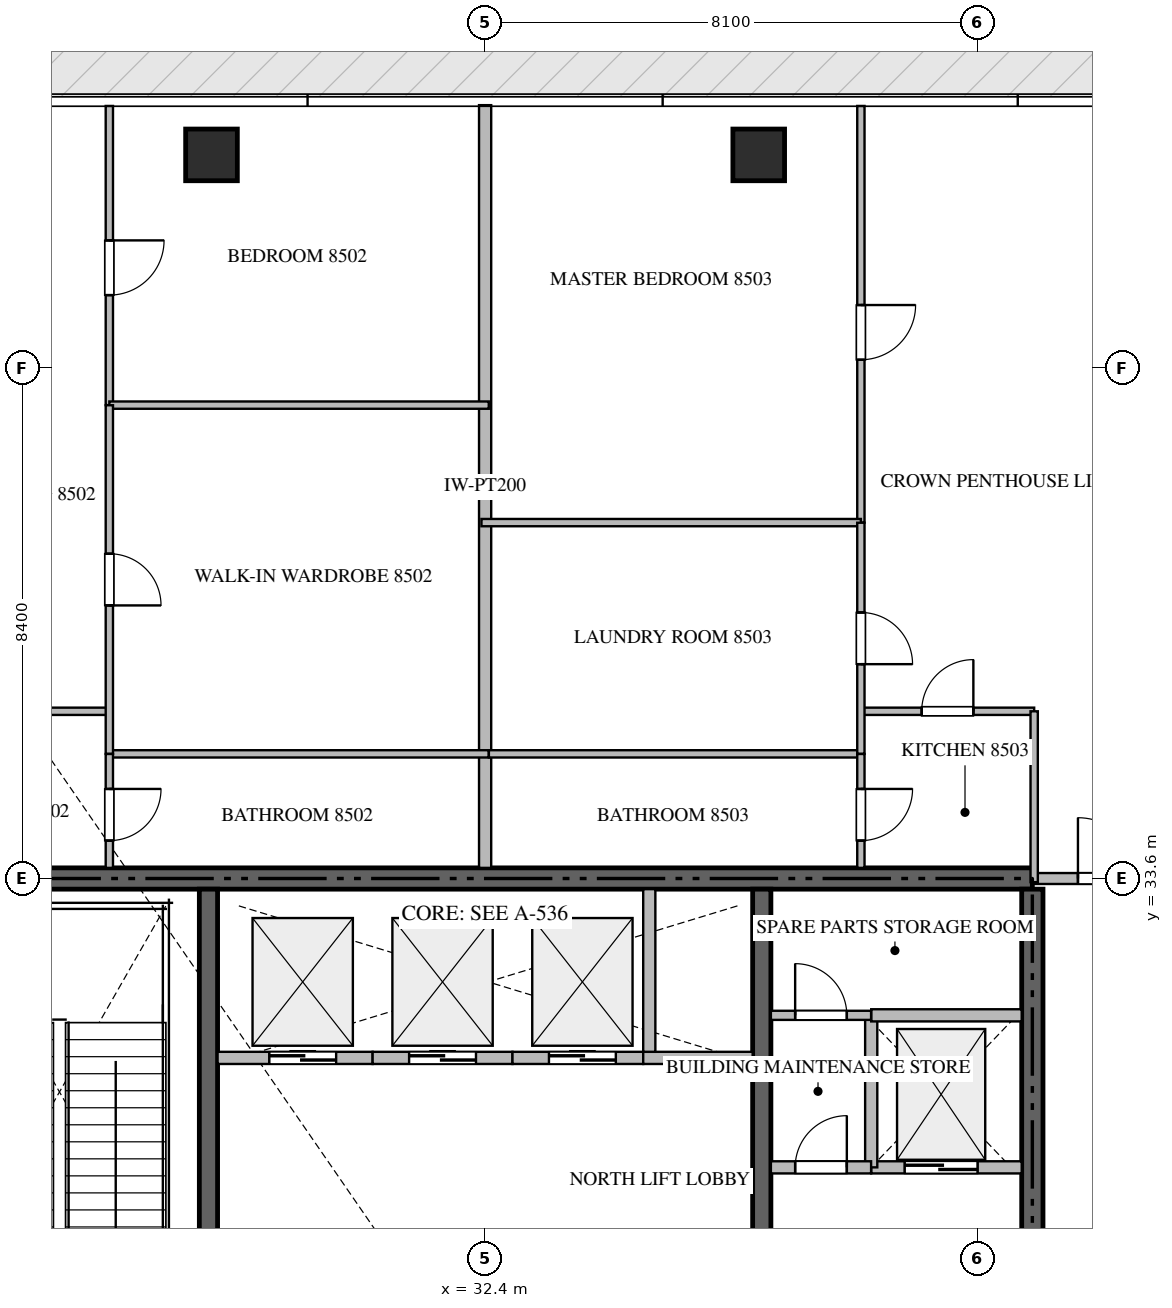
"""IFC4 building model, lengths in metres.
Left out: names, types, materials, properties, quantities, classifications, styles, units other than length and angle.
Written with IfcOpenShell. Run it as: python <this file> out.ifc"""

import sys

from ifc_helpers import new_model, si_unit, direction, frame, frame_2d, origin, origin_2d, place, context, subcontext, project, spatial, rectangle, extrude, source, transform, mapped, element, fill, save


model = new_model("IFC4")
c1 = context("Model", 3, precision=1e-05, world=origin(), true_north=direction((0.0, 1.0)))
c2 = subcontext(c1, "Body", "Model", "MODEL_VIEW")
j1 = project(units=[si_unit("LENGTHUNIT", "METRE"), si_unit("PLANEANGLEUNIT", "RADIAN")], contexts=[c1])
p1 = place(None, origin())
s1 = spatial("IfcSite", under=j1, at=p1, CompositionType="ELEMENT")
p2 = place(p1, origin())
s2 = spatial("IfcBuilding", under=s1, at=p2, CompositionType="ELEMENT")
p3 = place(p2, frame((0.0, 0.0, 342.05)))
s3 = spatial("IfcBuildingStorey", under=s2, at=p3, CompositionType="ELEMENT", Elevation=342.05)
p4 = place(p3, frame((41.4, 33.6, -0.26), z_axis=(0.0, 0.0, 1.0), x_axis=(-1.0, 0.0, 0.0)))
e1 = element("IfcWall", 1, at=p4, inside=s3, PredefinedType="SHEAR", context=c2, shape_type="SweptSolid", body=[
    extrude(rectangle(XDim=18.0, YDim=0.35, at=frame_2d((9.0, 0.0))), origin(), (0.0, 0.0, 1.0), 5.898),
])
p5 = place(p3, frame((41.4, 27.75, -0.26), z_axis=(0.0, 0.0, 1.0), x_axis=(0.0, 1.0, 0.0)))
e2 = element("IfcWall", 2, at=p5, inside=s3, PredefinedType="SHEAR", context=c2, shape_type="SweptSolid", body=[
    extrude(rectangle(XDim=5.675, YDim=0.35, at=frame_2d((2.837, 0.0))), origin(), (0.0, 0.0, 1.0), 5.898),
])
p6 = place(p3, frame((27.85, 23.55, -0.26), z_axis=(0.0, 0.0, 1.0), x_axis=(0.0, 1.0, 0.0)))
e3 = element("IfcWall", 3, at=p6, inside=s3, PredefinedType="SHEAR", context=c2, shape_type="SweptSolid", body=[
    extrude(rectangle(XDim=9.875, YDim=0.3, at=frame_2d((4.938, 0.0))), origin(), (0.0, 0.0, 1.0), 5.898),
])
p7 = place(p3, frame((36.95, 27.05, -0.26), z_axis=(0.0, 0.0, 1.0), x_axis=(0.0, 1.0, 0.0)))
e4 = element("IfcWall", 4, at=p7, inside=s3, PredefinedType="SHEAR", context=c2, shape_type="SweptSolid", body=[
    extrude(rectangle(XDim=6.375, YDim=0.3, at=frame_2d((3.188, 0.0))), origin(), (0.0, 0.0, 1.0), 5.898),
])
m1 = source(origin(), c2, "Body", "SweptSolid", [
    extrude(rectangle(XDim=0.85, YDim=0.85, at=origin_2d()), origin(), (0.0, 0.0, 1.0), 5.9),
])
for number, where, z_axis, x_axis in (
    (5, (27.9, 45.5, -0.26), (0.0, 0.0, 1.0), (1.0, 0.0, 0.0)),
    (6, (36.9, 45.5, -0.26), (0.0, 0.0, 1.0), (1.0, 0.0, 0.0)),
):
    element("IfcColumn", number, at=place(p3, frame(where, z_axis=z_axis, x_axis=x_axis)), inside=s3, PredefinedType="COLUMN", context=c2, shape_type="MappedRepresentation", body=[
        mapped(m1, transform((0.0, 0.0, 0.0), scale=1.0)),
    ])
p8 = place(p3, frame((38.75, 28.85, 0.0), z_axis=(0.0, 0.0, 1.0), x_axis=(1.0, 0.0, 0.0)))
e7 = element("IfcWall", 7, at=p8, inside=s3, PredefinedType="STANDARD", context=c2, shape_type="SweptSolid", body=[
    extrude(rectangle(XDim=2.475, YDim=0.2, at=frame_2d((1.238, 0.0))), origin(), (0.0, 0.0, 1.0), 5.64),
])
p9 = place(p8, frame((0.55, 0.0, 0.0)))
e8 = element("IfcOpeningElement", 8, at=p9, cuts=e7, PredefinedType="OPENING", context=c2, shape_type="SweptSolid", body=[
    extrude(rectangle(XDim=1.2, YDim=2.2, at=frame_2d((0.6, 1.1))), frame((0.0, 0.11, 0.0), z_axis=(0.0, -1.0, 0.0), x_axis=(1.0, 0.0, 0.0)), (0.0, 0.0, 1.0), 0.22),
])
p10 = place(p3, frame((28.0, 30.65, 0.0), z_axis=(0.0, 0.0, 1.0), x_axis=(1.0, 0.0, 0.0)))
e9 = element("IfcWall", 9, at=p10, inside=s3, PredefinedType="STANDARD", context=c2, shape_type="SweptSolid", body=[
    extrude(rectangle(XDim=2.55, YDim=0.2, at=frame_2d((1.275, 0.0))), origin(), (0.0, 0.0, 1.0), 5.64),
])
p11 = place(p10, frame((0.85, 0.0, 0.0)))
e10 = element("IfcOpeningElement", 10, at=p11, cuts=e9, PredefinedType="OPENING", context=c2, shape_type="SweptSolid", body=[
    extrude(rectangle(XDim=1.1, YDim=2.2, at=frame_2d((0.55, 1.1))), frame((0.0, 0.11, 0.0), z_axis=(0.0, -1.0, 0.0), x_axis=(1.0, 0.0, 0.0)), (0.0, 0.0, 1.0), 0.22),
])
p12 = place(p3, frame((30.55, 30.65, 0.0), z_axis=(0.0, 0.0, 1.0), x_axis=(1.0, 0.0, 0.0)))
e11 = element("IfcWall", 11, at=p12, inside=s3, PredefinedType="STANDARD", context=c2, shape_type="SweptSolid", body=[
    extrude(rectangle(XDim=2.3, YDim=0.2, at=frame_2d((1.15, 0.0))), origin(), (0.0, 0.0, 1.0), 5.64),
])
p13 = place(p12, frame((0.6, 0.0, 0.0)))
e12 = element("IfcOpeningElement", 12, at=p13, cuts=e11, PredefinedType="OPENING", context=c2, shape_type="SweptSolid", body=[
    extrude(rectangle(XDim=1.1, YDim=2.2, at=frame_2d((0.55, 1.1))), frame((0.0, 0.11, 0.0), z_axis=(0.0, -1.0, 0.0), x_axis=(1.0, 0.0, 0.0)), (0.0, 0.0, 1.0), 0.22),
])
p14 = place(p3, frame((32.85, 30.65, 0.0), z_axis=(0.0, 0.0, 1.0), x_axis=(1.0, 0.0, 0.0)))
e13 = element("IfcWall", 13, at=p14, inside=s3, PredefinedType="STANDARD", context=c2, shape_type="SweptSolid", body=[
    extrude(rectangle(XDim=2.15, YDim=0.2, at=frame_2d((1.075, 0.0))), origin(), (0.0, 0.0, 1.0), 5.64),
])
p15 = place(p14, frame((0.6, 0.0, 0.0)))
e14 = element("IfcOpeningElement", 14, at=p15, cuts=e13, PredefinedType="OPENING", context=c2, shape_type="SweptSolid", body=[
    extrude(rectangle(XDim=1.1, YDim=2.2, at=frame_2d((0.55, 1.1))), frame((0.0, 0.11, 0.0), z_axis=(0.0, -1.0, 0.0), x_axis=(1.0, 0.0, 0.0)), (0.0, 0.0, 1.0), 0.22),
])
p16 = place(p3, frame((35.0, 30.65, 0.0), z_axis=(0.0, 0.0, 1.0), x_axis=(1.0, 0.0, 0.0)))
e15 = element("IfcWall", 15, at=p16, inside=s3, PredefinedType="STANDARD", context=c2, shape_type="SweptSolid", body=[
    extrude(rectangle(XDim=1.8, YDim=0.2, at=frame_2d((0.9, 0.0))), origin(), (0.0, 0.0, 1.0), 5.64),
])
p17 = place(p3, frame((35.1, 30.75, 0.0), z_axis=(0.0, 0.0, 1.0), x_axis=(0.0, 1.0, 0.0)))
e16 = element("IfcWall", 16, at=p17, inside=s3, PredefinedType="STANDARD", context=c2, shape_type="SweptSolid", body=[
    extrude(rectangle(XDim=2.675, YDim=0.2, at=frame_2d((1.337, 0.0))), origin(), (0.0, 0.0, 1.0), 5.64),
])
p18 = place(p3, frame((38.75, 28.85, 0.0), z_axis=(0.0, 0.0, 1.0), x_axis=(0.0, 1.0, 0.0)))
e17 = element("IfcWall", 17, at=p18, inside=s3, PredefinedType="STANDARD", context=c2, shape_type="SweptSolid", body=[
    extrude(rectangle(XDim=2.5, YDim=0.2, at=frame_2d((1.25, 0.0))), origin(), (0.0, 0.0, 1.0), 5.64),
])
p19 = place(p3, frame((38.75, 31.35, 0.0), z_axis=(0.0, 0.0, 1.0), x_axis=(1.0, 0.0, 0.0)))
e18 = element("IfcWall", 18, at=p19, inside=s3, PredefinedType="STANDARD", context=c2, shape_type="SweptSolid", body=[
    extrude(rectangle(XDim=2.475, YDim=0.2, at=frame_2d((1.238, 0.0))), origin(), (0.0, 0.0, 1.0), 5.64),
])
p20 = place(p3, frame((37.1, 28.85, 0.0), z_axis=(0.0, 0.0, 1.0), x_axis=(1.0, 0.0, 0.0)))
e19 = element("IfcWall", 19, at=p20, inside=s3, PredefinedType="STANDARD", context=c2, shape_type="SweptSolid", body=[
    extrude(rectangle(XDim=1.648, YDim=0.2, at=frame_2d((0.824, 0.0))), origin(), (0.0, 0.0, 1.0), 5.64),
])
p21 = place(p20, frame((0.399, 0.0, 0.0)))
e20 = element("IfcOpeningElement", 20, at=p21, cuts=e19, PredefinedType="OPENING", context=c2, shape_type="SweptSolid", body=[
    extrude(rectangle(XDim=0.85, YDim=2.1, at=frame_2d((0.425, 1.05))), frame((0.0, 0.11, 0.0), z_axis=(0.0, -1.0, 0.0), x_axis=(1.0, 0.0, 0.0)), (0.0, 0.0, 1.0), 0.22),
])
p22 = place(p3, frame((37.1, 31.35, 0.0), z_axis=(0.0, 0.0, 1.0), x_axis=(1.0, 0.0, 0.0)))
e21 = element("IfcWall", 21, at=p22, inside=s3, PredefinedType="PARTITIONING", context=c2, shape_type="SweptSolid", body=[
    extrude(rectangle(XDim=1.648, YDim=0.15, at=frame_2d((0.824, 0.0))), origin(), (0.0, 0.0, 1.0), 5.64),
])
p23 = place(p22, frame((0.399, 0.0, 0.0)))
e22 = element("IfcOpeningElement", 22, at=p23, cuts=e21, PredefinedType="OPENING", context=c2, shape_type="SweptSolid", body=[
    extrude(rectangle(XDim=0.85, YDim=2.1, at=frame_2d((0.425, 1.05))), frame((0.0, 0.085, 0.0), z_axis=(0.0, -1.0, 0.0), x_axis=(1.0, 0.0, 0.0)), (0.0, 0.0, 1.0), 0.17),
])
p24 = place(p3, frame((32.4, 33.775, 0.0), z_axis=(0.0, 0.0, 1.0), x_axis=(0.0, 1.0, 0.0)))
e23 = element("IfcWall", 23, at=p24, inside=s3, PredefinedType="PARTITIONING", context=c2, shape_type="SweptSolid", body=[
    extrude(rectangle(XDim=12.543, YDim=0.2, at=frame_2d((6.271, 0.0))), origin(), (0.0, 0.0, 1.0), 5.64),
])
p25 = place(p3, frame((41.402, 33.6, 0.0), z_axis=(0.0, 0.0, 1.0), x_axis=(1.0, 0.0, 0.0)))
e24 = element("IfcWall", 24, at=p25, inside=s3, PredefinedType="PARTITIONING", context=c2, shape_type="SweptSolid", body=[
    extrude(rectangle(XDim=2.496, YDim=0.18, at=frame_2d((1.248, 0.0))), origin(), (0.0, 0.0, 1.0), 5.64),
])
p26 = place(p25, frame((0.748, 0.0, 0.0)))
e25 = element("IfcOpeningElement", 25, at=p26, cuts=e24, PredefinedType="OPENING", context=c2, shape_type="SweptSolid", body=[
    extrude(rectangle(XDim=1.0, YDim=2.15, at=frame_2d((0.5, 1.075))), frame((0.0, 0.1, 0.0), z_axis=(0.0, -1.0, 0.0), x_axis=(1.0, 0.0, 0.0)), (0.0, 0.0, 1.0), 0.2),
])
p27 = place(p3, frame((23.37, 36.35, 0.0), z_axis=(0.0, 0.0, 1.0), x_axis=(1.0, 0.0, 0.0)))
e26 = element("IfcWall", 26, at=p27, inside=s3, PredefinedType="PARTITIONING", context=c2, shape_type="SweptSolid", body=[
    extrude(rectangle(XDim=2.85, YDim=0.12, at=frame_2d((1.425, 0.0))), origin(), (0.0, 0.0, 1.0), 5.64),
])
p28 = place(p27, frame((1.0, 0.0, 0.0)))
e27 = element("IfcOpeningElement", 27, at=p28, cuts=e26, PredefinedType="OPENING", context=c2, shape_type="SweptSolid", body=[
    extrude(rectangle(XDim=0.85, YDim=2.1, at=frame_2d((0.425, 1.05))), frame((0.0, 0.07, 0.0), z_axis=(0.0, -1.0, 0.0), x_axis=(1.0, 0.0, 0.0)), (0.0, 0.0, 1.0), 0.14),
])
p29 = place(p3, frame((26.22, 46.305, 0.0), z_axis=(0.0, 0.0, 1.0), x_axis=(0.0, -1.0, 0.0)))
e28 = element("IfcWall", 28, at=p29, inside=s3, PredefinedType="PARTITIONING", context=c2, shape_type="SweptSolid", body=[
    extrude(rectangle(XDim=4.92, YDim=0.12, at=frame_2d((2.46, 0.0))), origin(), (0.0, 0.0, 1.0), 5.64),
])
p30 = place(p29, frame((2.211, 0.0, 0.0)))
e29 = element("IfcOpeningElement", 29, at=p30, cuts=e28, PredefinedType="OPENING", context=c2, shape_type="SweptSolid", body=[
    extrude(rectangle(XDim=0.9, YDim=2.1, at=frame_2d((0.45, 1.05))), frame((0.0, 0.07, 0.0), z_axis=(0.0, -1.0, 0.0), x_axis=(1.0, 0.0, 0.0)), (0.0, 0.0, 1.0), 0.14),
])
for number, where, z_axis, x_axis in (
    (30, (26.22, 41.385, 0.0), (0.0, 0.0, 1.0), (1.0, 0.0, 0.0)),
    (31, (26.22, 35.65, 0.0), (0.0, 0.0, 1.0), (1.0, 0.0, 0.0)),
):
    element("IfcWall", number, at=place(p3, frame(where, z_axis=z_axis, x_axis=x_axis)), inside=s3, PredefinedType="PARTITIONING", context=c2, shape_type="SweptSolid", body=[
        extrude(rectangle(XDim=6.24, YDim=0.12, at=frame_2d((3.12, 0.0))), origin(), (0.0, 0.0, 1.0), 5.64),
    ])
p31 = place(p3, frame((26.22, 41.383, 0.0), z_axis=(0.0, 0.0, 1.0), x_axis=(0.0, -1.0, 0.0)))
e32 = element("IfcWall", 32, at=p31, inside=s3, PredefinedType="PARTITIONING", context=c2, shape_type="SweptSolid", body=[
    extrude(rectangle(XDim=5.733, YDim=0.12, at=frame_2d((2.867, 0.0))), origin(), (0.0, 0.0, 1.0), 5.64),
])
p32 = place(p31, frame((2.442, 0.0, 0.0)))
e33 = element("IfcOpeningElement", 33, at=p32, cuts=e32, PredefinedType="OPENING", context=c2, shape_type="SweptSolid", body=[
    extrude(rectangle(XDim=0.85, YDim=2.1, at=frame_2d((0.425, 1.05))), frame((0.0, 0.07, 0.0), z_axis=(0.0, -1.0, 0.0), x_axis=(1.0, 0.0, 0.0)), (0.0, 0.0, 1.0), 0.14),
])
p33 = place(p3, frame((26.22, 35.648, 0.0), z_axis=(0.0, 0.0, 1.0), x_axis=(0.0, -1.0, 0.0)))
e34 = element("IfcWall", 34, at=p33, inside=s3, PredefinedType="PARTITIONING", context=c2, shape_type="SweptSolid", body=[
    extrude(rectangle(XDim=1.873, YDim=0.12, at=frame_2d((0.937, 0.0))), origin(), (0.0, 0.0, 1.0), 5.64),
])
p34 = place(p33, frame((0.575, 0.0, 0.0)))
e35 = element("IfcOpeningElement", 35, at=p34, cuts=e34, PredefinedType="OPENING", context=c2, shape_type="SweptSolid", body=[
    extrude(rectangle(XDim=0.85, YDim=2.1, at=frame_2d((0.425, 1.05))), frame((0.0, 0.07, 0.0), z_axis=(0.0, -1.0, 0.0), x_axis=(1.0, 0.0, 0.0)), (0.0, 0.0, 1.0), 0.14),
])
p35 = place(p3, frame((38.58, 36.35, 0.0), z_axis=(0.0, 0.0, 1.0), x_axis=(1.0, 0.0, 0.0)))
e36 = element("IfcWall", 36, at=p35, inside=s3, PredefinedType="PARTITIONING", context=c2, shape_type="SweptSolid", body=[
    extrude(rectangle(XDim=2.85, YDim=0.12, at=frame_2d((1.425, 0.0))), origin(), (0.0, 0.0, 1.0), 5.64),
])
p36 = place(p35, frame((1.0, 0.0, 0.0)))
e37 = element("IfcOpeningElement", 37, at=p36, cuts=e36, PredefinedType="OPENING", context=c2, shape_type="SweptSolid", body=[
    extrude(rectangle(XDim=0.85, YDim=2.1, at=frame_2d((0.425, 1.05))), frame((0.0, 0.07, 0.0), z_axis=(0.0, -1.0, 0.0), x_axis=(1.0, 0.0, 0.0)), (0.0, 0.0, 1.0), 0.14),
])
p37 = place(p3, frame((41.43, 36.35, 0.0), z_axis=(0.0, 0.0, 1.0), x_axis=(0.0, -1.0, 0.0)))
e38 = element("IfcWall", 38, at=p37, inside=s3, PredefinedType="PARTITIONING", context=c2, shape_type="SweptSolid", body=[
    extrude(rectangle(XDim=2.81, YDim=0.12, at=frame_2d((1.405, 0.0))), origin(), (0.0, 0.0, 1.0), 5.64),
])
p38 = place(p3, frame((38.58, 46.305, 0.0), z_axis=(0.0, 0.0, 1.0), x_axis=(0.0, -1.0, 0.0)))
e39 = element("IfcWall", 39, at=p38, inside=s3, PredefinedType="PARTITIONING", context=c2, shape_type="SweptSolid", body=[
    extrude(rectangle(XDim=6.852, YDim=0.12, at=frame_2d((3.426, 0.0))), origin(), (0.0, 0.0, 1.0), 5.64),
])
p39 = place(p38, frame((3.274, 0.0, 0.0)))
e40 = element("IfcOpeningElement", 40, at=p39, cuts=e39, PredefinedType="OPENING", context=c2, shape_type="SweptSolid", body=[
    extrude(rectangle(XDim=0.9, YDim=2.1, at=frame_2d((0.45, 1.05))), frame((0.0, 0.07, 0.0), z_axis=(0.0, -1.0, 0.0), x_axis=(1.0, 0.0, 0.0)), (0.0, 0.0, 1.0), 0.14),
])
p40 = place(p3, frame((32.34, 39.453, 0.0), z_axis=(0.0, 0.0, 1.0), x_axis=(1.0, 0.0, 0.0)))
e41 = element("IfcWall", 41, at=p40, inside=s3, PredefinedType="PARTITIONING", context=c2, shape_type="SweptSolid", body=[
    extrude(rectangle(XDim=6.24, YDim=0.12, at=frame_2d((3.12, 0.0))), origin(), (0.0, 0.0, 1.0), 5.64),
])
p41 = place(p3, frame((32.462, 35.65, 0.0), z_axis=(0.0, 0.0, 1.0), x_axis=(1.0, 0.0, 0.0)))
e42 = element("IfcWall", 42, at=p41, inside=s3, PredefinedType="PARTITIONING", context=c2, shape_type="SweptSolid", body=[
    extrude(rectangle(XDim=6.118, YDim=0.12, at=frame_2d((3.059, 0.0))), origin(), (0.0, 0.0, 1.0), 5.64),
])
p42 = place(p3, frame((38.58, 39.451, 0.0), z_axis=(0.0, 0.0, 1.0), x_axis=(0.0, -1.0, 0.0)))
e43 = element("IfcWall", 43, at=p42, inside=s3, PredefinedType="PARTITIONING", context=c2, shape_type="SweptSolid", body=[
    extrude(rectangle(XDim=3.801, YDim=0.12, at=frame_2d((1.9, 0.0))), origin(), (0.0, 0.0, 1.0), 5.64),
])
p43 = place(p42, frame((1.476, 0.0, 0.0)))
e44 = element("IfcOpeningElement", 44, at=p43, cuts=e43, PredefinedType="OPENING", context=c2, shape_type="SweptSolid", body=[
    extrude(rectangle(XDim=0.85, YDim=2.1, at=frame_2d((0.425, 1.05))), frame((0.0, 0.07, 0.0), z_axis=(0.0, -1.0, 0.0), x_axis=(1.0, 0.0, 0.0)), (0.0, 0.0, 1.0), 0.14),
])
p44 = place(p3, frame((38.58, 35.648, 0.0), z_axis=(0.0, 0.0, 1.0), x_axis=(0.0, -1.0, 0.0)))
e45 = element("IfcWall", 45, at=p44, inside=s3, PredefinedType="PARTITIONING", context=c2, shape_type="SweptSolid", body=[
    extrude(rectangle(XDim=1.873, YDim=0.12, at=frame_2d((0.937, 0.0))), origin(), (0.0, 0.0, 1.0), 5.64),
])
p45 = place(p44, frame((0.575, 0.0, 0.0)))
e46 = element("IfcOpeningElement", 46, at=p45, cuts=e45, PredefinedType="OPENING", context=c2, shape_type="SweptSolid", body=[
    extrude(rectangle(XDim=0.85, YDim=2.1, at=frame_2d((0.425, 1.05))), frame((0.0, 0.07, 0.0), z_axis=(0.0, -1.0, 0.0), x_axis=(1.0, 0.0, 0.0)), (0.0, 0.0, 1.0), 0.14),
])
m2 = source(origin(), c2, "Body", "SweptSolid", [
    extrude(rectangle(XDim=1.2, YDim=2.2, at=frame_2d((0.6, 1.1))), frame((0.0, 0.025, 0.0), z_axis=(0.0, -1.0, 0.0), x_axis=(1.0, 0.0, 0.0)), (0.0, 0.0, 1.0), 0.05),
])
p46 = place(p9, origin())
e47 = element("IfcDoor", 47, at=p46, inside=s3, OperationType="DOUBLE_DOOR_SLIDING", PredefinedType="DOOR", context=c2, shape_type="MappedRepresentation", body=[
    mapped(m2, transform((0.0, 0.0, 0.0), scale=1.0)),
])
fill(e8, e47)
m3 = source(origin(), c2, "Body", "SweptSolid", [
    extrude(rectangle(XDim=1.1, YDim=2.2, at=frame_2d((0.55, 1.1))), frame((0.0, 0.025, 0.0), z_axis=(0.0, -1.0, 0.0), x_axis=(1.0, 0.0, 0.0)), (0.0, 0.0, 1.0), 0.05),
])
p47 = place(p11, origin())
e48 = element("IfcDoor", 48, at=p47, inside=s3, OperationType="DOUBLE_DOOR_SLIDING", PredefinedType="DOOR", context=c2, shape_type="MappedRepresentation", body=[
    mapped(m3, transform((0.0, 0.0, 0.0), scale=1.0)),
])
fill(e10, e48)
p48 = place(p13, origin())
e49 = element("IfcDoor", 49, at=p48, inside=s3, OperationType="DOUBLE_DOOR_SLIDING", PredefinedType="DOOR", context=c2, shape_type="MappedRepresentation", body=[
    mapped(m3, transform((0.0, 0.0, 0.0), scale=1.0)),
])
fill(e12, e49)
p49 = place(p15, origin())
e50 = element("IfcDoor", 50, at=p49, inside=s3, OperationType="DOUBLE_DOOR_SLIDING", PredefinedType="DOOR", context=c2, shape_type="MappedRepresentation", body=[
    mapped(m3, transform((0.0, 0.0, 0.0), scale=1.0)),
])
fill(e14, e50)
m4 = source(origin(), c2, "Body", "SweptSolid", [
    extrude(rectangle(XDim=0.85, YDim=2.1, at=frame_2d((0.425, 1.05))), frame((0.0, 0.025, 0.0), z_axis=(0.0, -1.0, 0.0), x_axis=(1.0, 0.0, 0.0)), (0.0, 0.0, 1.0), 0.05),
])
p50 = place(p21, origin())
e51 = element("IfcDoor", 51, at=p50, inside=s3, OperationType="SINGLE_SWING_RIGHT", PredefinedType="DOOR", context=c2, shape_type="MappedRepresentation", body=[
    mapped(m4, transform((0.0, 0.0, 0.0), scale=1.0)),
])
fill(e20, e51)
p51 = place(p23, origin())
e52 = element("IfcDoor", 52, at=p51, inside=s3, OperationType="SINGLE_SWING_LEFT", PredefinedType="DOOR", context=c2, shape_type="MappedRepresentation", body=[
    mapped(m4, transform((0.0, 0.0, 0.0), scale=1.0)),
])
fill(e22, e52)
m5 = source(origin(), c2, "Body", "SweptSolid", [
    extrude(rectangle(XDim=1.0, YDim=2.15, at=frame_2d((0.5, 1.075))), frame((0.0, 0.025, 0.0), z_axis=(0.0, -1.0, 0.0), x_axis=(1.0, 0.0, 0.0)), (0.0, 0.0, 1.0), 0.05),
])
p52 = place(p26, origin())
e53 = element("IfcDoor", 53, at=p52, inside=s3, OperationType="SINGLE_SWING_LEFT", PredefinedType="DOOR", context=c2, shape_type="MappedRepresentation", body=[
    mapped(m5, transform((0.0, 0.0, 0.0), scale=1.0)),
])
fill(e25, e53)
m6 = source(origin(), c2, "Body", "SweptSolid", [
    extrude(rectangle(XDim=0.9, YDim=2.1, at=frame_2d((0.45, 1.05))), frame((0.0, 0.025, 0.0), z_axis=(0.0, -1.0, 0.0), x_axis=(1.0, 0.0, 0.0)), (0.0, 0.0, 1.0), 0.05),
])
p53 = place(p30, origin())
e54 = element("IfcDoor", 54, at=p53, inside=s3, OperationType="SINGLE_SWING_LEFT", PredefinedType="DOOR", context=c2, shape_type="MappedRepresentation", body=[
    mapped(m6, transform((0.0, 0.0, 0.0), scale=1.0)),
])
fill(e29, e54)
p54 = place(p32, origin())
e55 = element("IfcDoor", 55, at=p54, inside=s3, OperationType="SINGLE_SWING_RIGHT", PredefinedType="DOOR", context=c2, shape_type="MappedRepresentation", body=[
    mapped(m4, transform((0.0, 0.0, 0.0), scale=1.0)),
])
fill(e33, e55)
p55 = place(p34, origin())
e56 = element("IfcDoor", 56, at=p55, inside=s3, OperationType="SINGLE_SWING_LEFT", PredefinedType="DOOR", context=c2, shape_type="MappedRepresentation", body=[
    mapped(m4, transform((0.0, 0.0, 0.0), scale=1.0)),
])
fill(e35, e56)
p56 = place(p36, origin())
e57 = element("IfcDoor", 57, at=p56, inside=s3, OperationType="SINGLE_SWING_RIGHT", PredefinedType="DOOR", context=c2, shape_type="MappedRepresentation", body=[
    mapped(m4, transform((0.0, 0.0, 0.0), scale=1.0)),
])
fill(e37, e57)
p57 = place(p39, origin())
e58 = element("IfcDoor", 58, at=p57, inside=s3, OperationType="SINGLE_SWING_LEFT", PredefinedType="DOOR", context=c2, shape_type="MappedRepresentation", body=[
    mapped(m6, transform((0.0, 0.0, 0.0), scale=1.0)),
])
fill(e40, e58)
p58 = place(p43, origin())
e59 = element("IfcDoor", 59, at=p58, inside=s3, OperationType="SINGLE_SWING_RIGHT", PredefinedType="DOOR", context=c2, shape_type="MappedRepresentation", body=[
    mapped(m4, transform((0.0, 0.0, 0.0), scale=1.0)),
])
fill(e44, e59)
p59 = place(p45, origin())
e60 = element("IfcDoor", 60, at=p59, inside=s3, OperationType="SINGLE_SWING_LEFT", PredefinedType="DOOR", context=c2, shape_type="MappedRepresentation", body=[
    mapped(m4, transform((0.0, 0.0, 0.0), scale=1.0)),
])
fill(e46, e60)
save(model, sys.argv[1])
